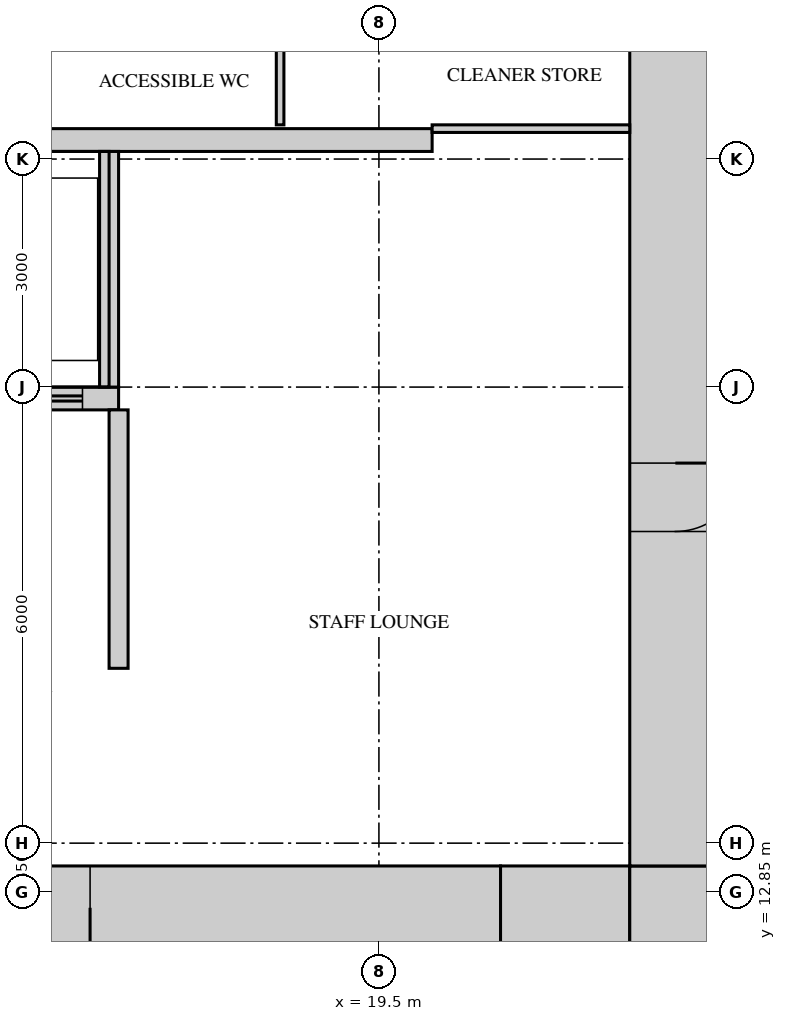
"""IFC4 building model, lengths in metres.
Left out: names, types, materials, properties, quantities, classifications, styles, units other than length and angle.
Written with IfcOpenShell. Run it as: python <this file> out.ifc"""

import sys

from ifc_helpers import new_model, si_unit, direction, frame, frame_2d, origin, place, context, subcontext, project, spatial, rectangle, extrude, source, transform, mapped, element, fill, save


model = new_model("IFC4")
c1 = context("Model", 3, precision=1e-05, world=origin(), true_north=direction((0.0, 1.0)))
c2 = subcontext(c1, "Body", "Model", "MODEL_VIEW")
j1 = project(units=[si_unit("LENGTHUNIT", "METRE"), si_unit("PLANEANGLEUNIT", "RADIAN")], contexts=[c1])
p1 = place(None, origin())
s1 = spatial("IfcSite", under=j1, at=p1, CompositionType="ELEMENT")
p2 = place(p1, origin())
s2 = spatial("IfcBuilding", under=s1, at=p2, CompositionType="ELEMENT")
p3 = place(p2, frame((0.0, 0.0, 60.0)))
s3 = spatial("IfcBuildingStorey", under=s2, at=p3, CompositionType="ELEMENT", Elevation=60.0)
m1 = source(origin(), c2, "Body", "SweptSolid", [
    extrude(rectangle(XDim=7.2, YDim=1.1, at=frame_2d((3.6, 0.0))), origin(), (0.0, 0.0, 1.0), 4.2),
])
p4 = place(p3, frame((13.9, 12.65, 0.0), z_axis=(0.0, 0.0, 1.0), x_axis=(1.0, 0.0, 0.0)))
e1 = element("IfcWall", 1, at=p4, inside=s3, PredefinedType="SHEAR", context=c2, shape_type="MappedRepresentation", body=[
    mapped(m1, transform((0.0, 0.0, 0.0))),
])
m2 = source(origin(), c2, "Body", "SweptSolid", [
    extrude(rectangle(XDim=1.0, YDim=2.1, at=frame_2d((0.5, 1.05))), frame((0.0, 0.56, 0.0), z_axis=(0.0, -1.0, 0.0), x_axis=(1.0, 0.0, 0.0)), (0.0, 0.0, 1.0), 1.12),
])
p5 = place(p4, frame((0.8, 0.0, 0.0)))
e2 = element("IfcOpeningElement", 2, at=p5, cuts=e1, PredefinedType="OPENING", context=c2, shape_type="MappedRepresentation", body=[
    mapped(m2, transform((0.0, 0.0, 0.0))),
])
m3 = source(origin(), c2, "Body", "SweptSolid", [
    extrude(rectangle(XDim=1.7, YDim=1.2, at=frame_2d((0.85, 0.0))), origin(), (0.0, 0.0, 1.0), 4.2),
])
p6 = place(p3, frame((21.1, 12.6, 0.0), z_axis=(0.0, 0.0, 1.0), x_axis=(1.0, 0.0, 0.0)))
e3 = element("IfcWall", 3, at=p6, inside=s3, PredefinedType="SHEAR", context=c2, shape_type="MappedRepresentation", body=[
    mapped(m3, transform((0.0, 0.0, 0.0))),
])
m4 = source(origin(), c2, "Body", "SweptSolid", [
    extrude(rectangle(XDim=1.2, YDim=1.2, at=frame_2d((0.6, 0.0))), origin(), (0.0, 0.0, 1.0), 4.2),
])
p7 = place(p3, frame((22.8, 12.6, 0.0), z_axis=(0.0, 0.0, 1.0), x_axis=(1.0, 0.0, 0.0)))
e4 = element("IfcWall", 4, at=p7, inside=s3, PredefinedType="SHEAR", context=c2, shape_type="MappedRepresentation", body=[
    mapped(m4, transform((0.0, 0.0, 0.0))),
])
m5 = source(origin(), c2, "Body", "SweptSolid", [
    extrude(rectangle(XDim=27.6, YDim=1.2, at=frame_2d((13.8, 0.0))), origin(), (0.0, 0.0, 1.0), 4.2),
])
p8 = place(p3, frame((23.4, 13.2, 0.0), z_axis=(0.0, 0.0, 1.0), x_axis=(0.0, 1.0, 0.0)))
e5 = element("IfcWall", 5, at=p8, inside=s3, PredefinedType="SHEAR", context=c2, shape_type="MappedRepresentation", body=[
    mapped(m5, transform((0.0, 0.0, 0.0))),
])
m6 = source(origin(), c2, "Body", "SweptSolid", [
    extrude(rectangle(XDim=1.8, YDim=2.1, at=frame_2d((0.9, 1.05))), frame((0.0, 0.61, 0.0), z_axis=(0.0, -1.0, 0.0), x_axis=(1.0, 0.0, 0.0)), (0.0, 0.0, 1.0), 1.22),
])
p9 = place(p8, frame((22.4, 0.0, 0.0)))
e6 = element("IfcOpeningElement", 6, at=p9, cuts=e5, PredefinedType="OPENING", context=c2, shape_type="MappedRepresentation", body=[
    mapped(m6, transform((0.0, 0.0, 0.0))),
])
m7 = source(origin(), c2, "Body", "SweptSolid", [
    extrude(rectangle(XDim=1.2, YDim=2.1, at=frame_2d((0.6, 1.05))), frame((0.0, 0.61, 0.0), z_axis=(0.0, -1.0, 0.0), x_axis=(1.0, 0.0, 0.0)), (0.0, 0.0, 1.0), 1.22),
])
p10 = place(p8, frame((12.15, 0.0, 0.0)))
e7 = element("IfcOpeningElement", 7, at=p10, cuts=e5, PredefinedType="OPENING", context=c2, shape_type="MappedRepresentation", body=[
    mapped(m7, transform((0.0, 0.0, 0.0))),
])
m8 = source(origin(), c2, "Body", "SweptSolid", [
    extrude(rectangle(XDim=0.9, YDim=2.1, at=frame_2d((0.45, 1.05))), frame((0.0, 0.61, 0.0), z_axis=(0.0, -1.0, 0.0), x_axis=(1.0, 0.0, 0.0)), (0.0, 0.0, 1.0), 1.22),
])
p11 = place(p8, frame((4.4, 0.0, 0.0)))
e8 = element("IfcOpeningElement", 8, at=p11, cuts=e5, PredefinedType="OPENING", context=c2, shape_type="MappedRepresentation", body=[
    mapped(m8, transform((0.0, 0.0, 0.0))),
])
m9 = source(origin(), c2, "Body", "SweptSolid", [
    extrude(rectangle(XDim=13.0, YDim=0.3, at=frame_2d((6.5, 0.0))), origin(), (0.0, 0.0, 1.0), 4.2),
])
p12 = place(p3, frame((7.2, 22.75, 0.0), z_axis=(0.0, 0.0, 1.0), x_axis=(1.0, 0.0, 0.0)))
e9 = element("IfcWall", 9, at=p12, inside=s3, PredefinedType="STANDARD", context=c2, shape_type="MappedRepresentation", body=[
    mapped(m9, transform((0.0, 0.0, 0.0))),
])
m10 = source(origin(), c2, "Body", "SweptSolid", [
    extrude(rectangle(XDim=8.875, YDim=0.3, at=frame_2d((4.438, 0.0))), origin(), (0.0, 0.0, 1.0), 4.2),
])
p13 = place(p3, frame((7.2, 19.35, 0.0), z_axis=(0.0, 0.0, 1.0), x_axis=(1.0, 0.0, 0.0)))
e10 = element("IfcWall", 10, at=p13, inside=s3, PredefinedType="STANDARD", context=c2, shape_type="MappedRepresentation", body=[
    mapped(m10, transform((0.0, 0.0, 0.0))),
])
m11 = source(origin(), c2, "Body", "SweptSolid", [
    extrude(rectangle(XDim=1.2, YDim=2.1, at=frame_2d((0.6, 1.05))), frame((0.0, 0.16, 0.0), z_axis=(0.0, -1.0, 0.0), x_axis=(1.0, 0.0, 0.0)), (0.0, 0.0, 1.0), 0.32),
])
p14 = place(p13, frame((0.45, 0.0, 0.0)))
e11 = element("IfcOpeningElement", 11, at=p14, cuts=e10, PredefinedType="OPENING", context=c2, shape_type="MappedRepresentation", body=[
    mapped(m11, transform((0.0, 0.0, 0.0))),
])
p15 = place(p13, frame((2.8, 0.0, 0.0)))
e12 = element("IfcOpeningElement", 12, at=p15, cuts=e10, PredefinedType="OPENING", context=c2, shape_type="MappedRepresentation", body=[
    mapped(m11, transform((0.0, 0.0, 0.0))),
])
p16 = place(p13, frame((5.05, 0.0, 0.0)))
e13 = element("IfcOpeningElement", 13, at=p16, cuts=e10, PredefinedType="OPENING", context=c2, shape_type="MappedRepresentation", body=[
    mapped(m11, transform((0.0, 0.0, 0.0))),
])
p17 = place(p13, frame((7.2, 0.0, 0.0)))
e14 = element("IfcOpeningElement", 14, at=p17, cuts=e10, PredefinedType="OPENING", context=c2, shape_type="MappedRepresentation", body=[
    mapped(m11, transform((0.0, 0.0, 0.0))),
])
m12 = source(origin(), c2, "Body", "SweptSolid", [
    extrude(rectangle(XDim=3.1, YDim=0.25, at=frame_2d((1.55, 0.0))), origin(), (0.0, 0.0, 1.0), 4.2),
])
p18 = place(p3, frame((15.95, 19.5, 0.0), z_axis=(0.0, 0.0, 1.0), x_axis=(0.0, 1.0, 0.0)))
e15 = element("IfcWall", 15, at=p18, inside=s3, PredefinedType="STANDARD", context=c2, shape_type="MappedRepresentation", body=[
    mapped(m12, transform((0.0, 0.0, 0.0))),
])
m13 = source(origin(), c2, "Body", "SweptSolid", [
    extrude(rectangle(XDim=3.4, YDim=0.25, at=frame_2d((1.7, 0.0))), origin(), (0.0, 0.0, 1.0), 4.2),
])
p19 = place(p3, frame((16.075, 15.8, 0.0), z_axis=(0.0, 0.0, 1.0), x_axis=(0.0, 1.0, 0.0)))
e16 = element("IfcWall", 16, at=p19, inside=s3, PredefinedType="STANDARD", context=c2, shape_type="MappedRepresentation", body=[
    mapped(m13, transform((0.0, 0.0, 0.0))),
])
m14 = source(origin(), c2, "Body", "SweptSolid", [
    extrude(rectangle(XDim=2.6, YDim=0.1, at=frame_2d((1.3, 0.0))), origin(), (0.0, 0.0, 1.0), 4.3),
])
p20 = place(p3, frame((20.2, 22.9, 0.0), z_axis=(0.0, 0.0, 1.0), x_axis=(1.0, 0.0, 0.0)))
e17 = element("IfcWall", 17, at=p20, inside=s3, PredefinedType="PARTITIONING", context=c2, shape_type="MappedRepresentation", body=[
    mapped(m14, transform((0.0, 0.0, 0.0))),
])
m15 = source(origin(), c2, "Body", "SweptSolid", [
    extrude(rectangle(XDim=2.0, YDim=0.1, at=frame_2d((1.0, 0.0))), origin(), (0.0, 0.0, 1.0), 4.3),
])
p21 = place(p3, frame((18.2, 22.95, 0.0), z_axis=(0.0, 0.0, 1.0), x_axis=(0.0, 1.0, 0.0)))
e18 = element("IfcWall", 18, at=p21, inside=s3, PredefinedType="PARTITIONING", context=c2, shape_type="MappedRepresentation", body=[
    mapped(m15, transform((0.0, 0.0, 0.0))),
])
m16 = source(origin(), c2, "Body", "SweptSolid", [
    extrude(rectangle(XDim=0.9, YDim=2.1, at=frame_2d((0.45, 1.05))), frame((0.0, 0.55, 0.0), z_axis=(0.0, -1.0, 0.0), x_axis=(1.0, 0.0, 0.0)), (0.0, 0.0, 1.0), 1.1),
])
p22 = place(p11, origin())
e19 = element("IfcDoor", 19, at=p22, inside=s3, OperationType="SINGLE_SWING_RIGHT", PredefinedType="DOOR", context=c2, shape_type="MappedRepresentation", body=[
    mapped(m16, transform((0.0, 0.0, 0.0))),
])
fill(e8, e19)
m17 = source(origin(), c2, "Body", "SweptSolid", [
    extrude(rectangle(XDim=1.0, YDim=2.1, at=frame_2d((0.5, 1.05))), frame((0.0, 0.5, 0.0), z_axis=(0.0, -1.0, 0.0), x_axis=(1.0, 0.0, 0.0)), (0.0, 0.0, 1.0), 1.0),
])
p23 = place(p5, origin())
e20 = element("IfcDoor", 20, at=p23, inside=s3, OperationType="SINGLE_SWING_RIGHT", PredefinedType="DOOR", context=c2, shape_type="MappedRepresentation", body=[
    mapped(m17, transform((0.0, 0.0, 0.0))),
])
fill(e2, e20)
m18 = source(origin(), c2, "Body", "SweptSolid", [
    extrude(rectangle(XDim=1.2, YDim=2.1, at=frame_2d((0.6, 1.05))), frame((0.0, 0.025, 0.0), z_axis=(0.0, -1.0, 0.0), x_axis=(1.0, 0.0, 0.0)), (0.0, 0.0, 1.0), 0.05),
])
p24 = place(p17, origin())
e21 = element("IfcDoor", 21, at=p24, inside=s3, OperationType="DOUBLE_DOOR_SLIDING", PredefinedType="DOOR", context=c2, shape_type="MappedRepresentation", body=[
    mapped(m18, transform((0.0, 0.0, 0.0))),
])
fill(e14, e21)
save(model, sys.argv[1])
